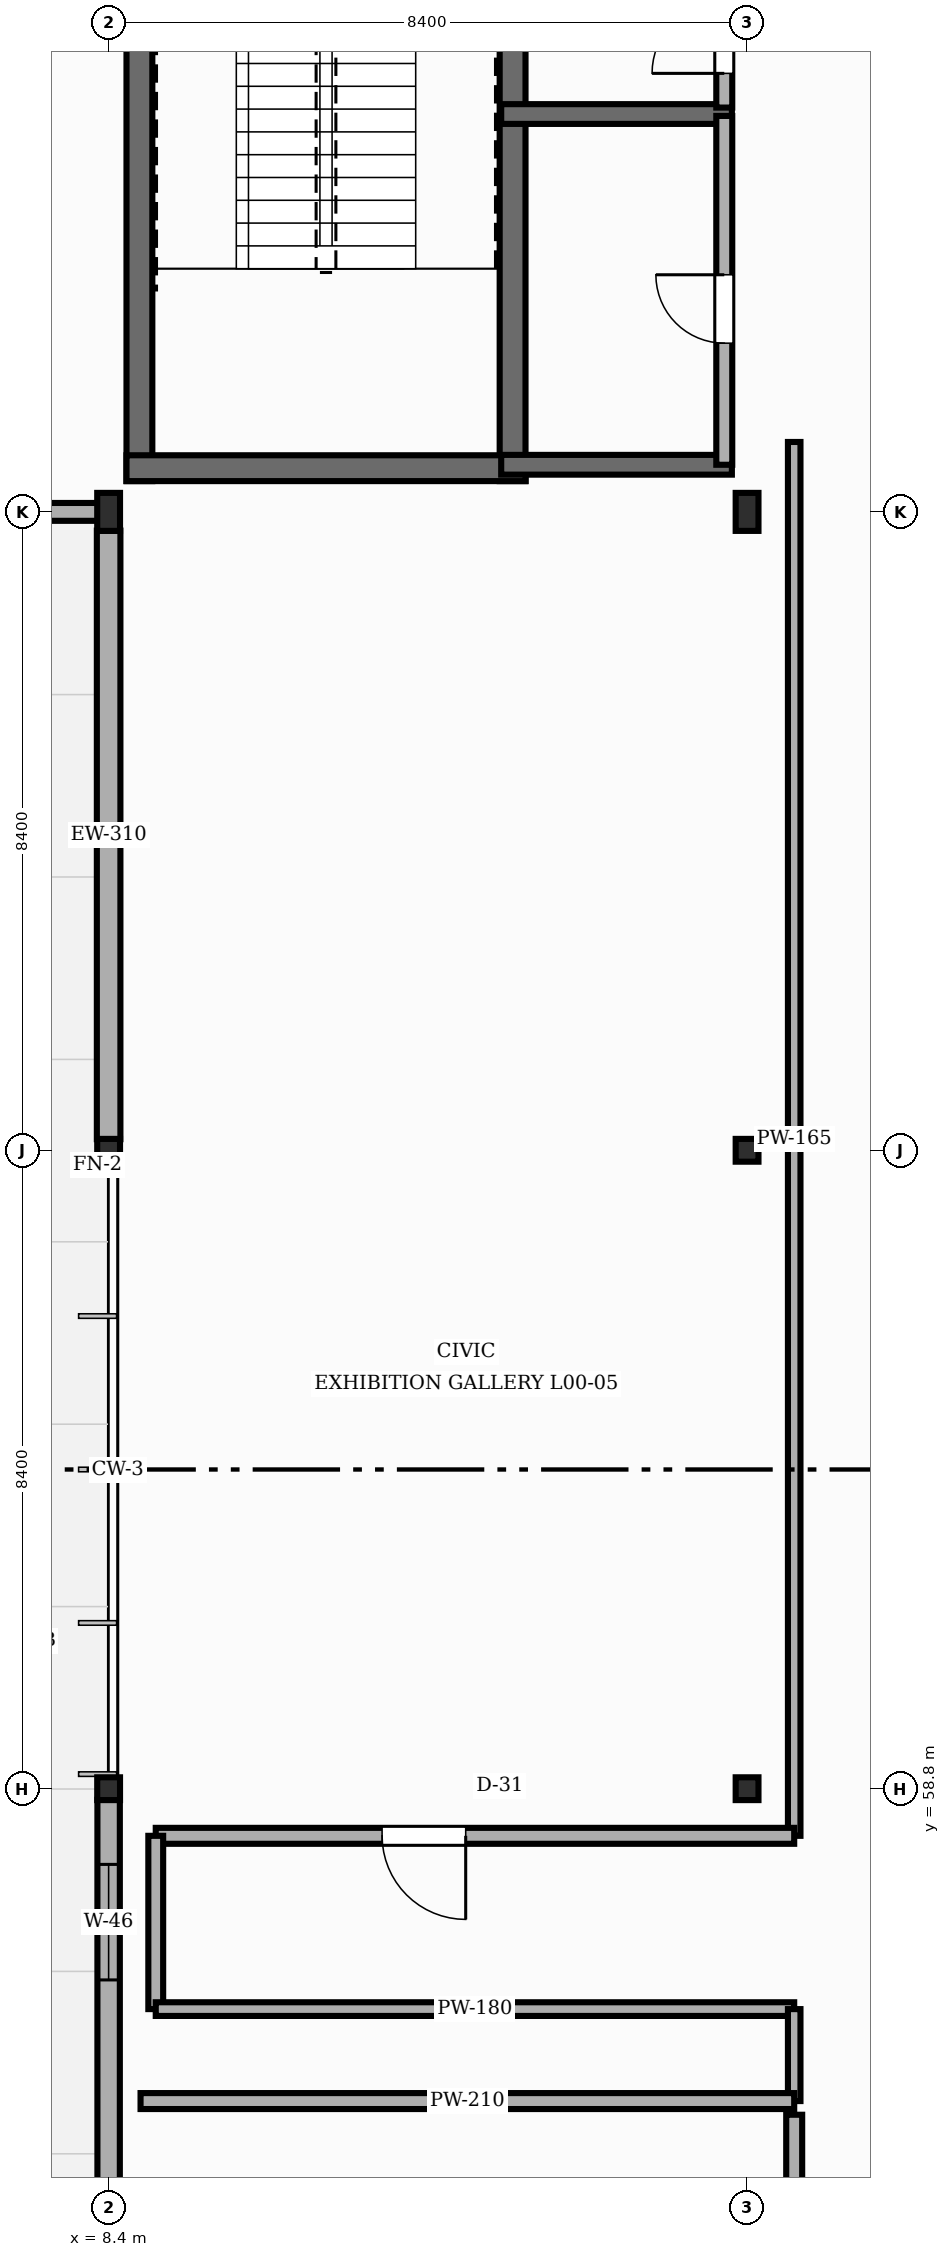
"""IFC4 building model, lengths in metres.
Left out: names, types, materials, properties, quantities, classifications, styles, units other than length and angle.
Written with IfcOpenShell. Run it as: python <this file> out.ifc"""

import sys

from ifc_helpers import new_model, si_unit, direction, frame, frame_2d, origin, origin_2d, place, context, subcontext, project, spatial, rectangle, i_section, extrude, element, fill, save


model = new_model("IFC4")
c1 = context("Model", 3, precision=1e-05, world=origin(), true_north=direction((0.0, 1.0)))
c2 = subcontext(c1, "Body", "Model", "MODEL_VIEW")
j1 = project(units=[si_unit("LENGTHUNIT", "METRE"), si_unit("PLANEANGLEUNIT", "RADIAN")], contexts=[c1])
p1 = place(None, origin())
s1 = spatial("IfcSite", under=j1, at=p1, CompositionType="ELEMENT")
p2 = place(p1, origin())
s2 = spatial("IfcBuilding", under=s1, at=p2, CompositionType="ELEMENT")
p3 = place(p2, origin())
s3 = spatial("IfcBuildingStorey", under=s2, at=p3, CompositionType="ELEMENT", Elevation=0.0)
for number, where, z_axis, x_axis in (
    (1, (8.4, 58.8, 0.0), (0.0, 0.0, 1.0), (1.0, 0.0, 0.0)),
    (2, (8.4, 67.2, 0.0), (0.0, 0.0, 1.0), (1.0, 0.0, 0.0)),
):
    element("IfcColumn", number, at=place(p3, frame(where, z_axis=z_axis, x_axis=x_axis)), inside=s3, PredefinedType="COLUMN", context=c2, shape_type="SweptSolid", body=[
        extrude(i_section(OverallWidth=0.3, OverallDepth=0.3, WebThickness=0.011, FlangeThickness=0.019, FilletRadius=0.027, at=origin_2d()), origin(), (0.0, 0.0, 1.0), 5.4),
    ])
p4 = place(p3, frame((8.4, 75.6, 0.0), z_axis=(0.0, 0.0, 1.0), x_axis=(1.0, 0.0, 0.0)))
e3 = element("IfcColumn", 3, at=p4, inside=s3, PredefinedType="COLUMN", context=c2, shape_type="SweptSolid", body=[
    extrude(i_section(OverallWidth=0.3, OverallDepth=0.5, WebThickness=0.014, FlangeThickness=0.028, FilletRadius=0.027, at=origin_2d()), origin(), (0.0, 0.0, 1.0), 5.4),
])
for number, where, z_axis, x_axis in (
    (4, (16.8, 58.8, 0.0), (0.0, 0.0, 1.0), (1.0, 0.0, 0.0)),
    (5, (16.8, 67.2, 0.0), (0.0, 0.0, 1.0), (1.0, 0.0, 0.0)),
):
    element("IfcColumn", number, at=place(p3, frame(where, z_axis=z_axis, x_axis=x_axis)), inside=s3, PredefinedType="COLUMN", context=c2, shape_type="SweptSolid", body=[
        extrude(i_section(OverallWidth=0.3, OverallDepth=0.3, WebThickness=0.011, FlangeThickness=0.019, FilletRadius=0.027, at=origin_2d()), origin(), (0.0, 0.0, 1.0), 5.4),
    ])
p5 = place(p3, frame((16.8, 75.6, 0.0), z_axis=(0.0, 0.0, 1.0), x_axis=(1.0, 0.0, 0.0)))
e6 = element("IfcColumn", 6, at=p5, inside=s3, PredefinedType="COLUMN", context=c2, shape_type="SweptSolid", body=[
    extrude(i_section(OverallWidth=0.3, OverallDepth=0.5, WebThickness=0.014, FlangeThickness=0.028, FilletRadius=0.027, at=origin_2d()), origin(), (0.0, 0.0, 1.0), 5.4),
])
p6 = place(p3, frame((0.008, 75.6, 0.0), z_axis=(0.0, 0.0, 1.0), x_axis=(1.0, 0.0, 0.0)))
e7 = element("IfcWall", 7, at=p6, inside=s3, PredefinedType="STANDARD", context=c2, shape_type="SweptSolid", body=[
    extrude(rectangle(XDim=8.384, YDim=0.235, at=frame_2d((4.192, 0.0))), origin(), (0.0, 0.0, 1.0), 4.827),
])
p7 = place(p3, frame((8.4, 75.354, 0.0), z_axis=(0.0, 0.0, 1.0), x_axis=(0.0, -1.0, 0.0)))
e8 = element("IfcWall", 8, at=p7, inside=s3, PredefinedType="STANDARD", context=c2, shape_type="SweptSolid", body=[
    extrude(rectangle(XDim=8.008, YDim=0.31, at=frame_2d((4.004, 0.0))), origin(), (0.0, 0.0, 1.0), 4.887),
])
p8 = place(p3, frame((8.4, 58.654, 0.0), z_axis=(0.0, 0.0, 1.0), x_axis=(0.0, -1.0, 0.0)))
e9 = element("IfcWall", 9, at=p8, inside=s3, PredefinedType="STANDARD", context=c2, shape_type="SweptSolid", body=[
    extrude(rectangle(XDim=8.108, YDim=0.295, at=frame_2d((4.054, 0.0))), origin(), (0.0, 0.0, 1.0), 4.887),
])
p9 = place(p8, frame((0.85, 0.0, 0.9)))
e10 = element("IfcOpeningElement", 10, at=p9, cuts=e9, PredefinedType="OPENING", context=c2, shape_type="SweptSolid", body=[
    extrude(rectangle(XDim=1.52, YDim=1.85, at=frame_2d((0.76, 0.925))), frame((0.0, 0.157, 0.0), z_axis=(0.0, -1.0, 0.0), x_axis=(1.0, 0.0, 0.0)), (0.0, 0.0, 1.0), 0.315),
])
p10 = place(p8, frame((5.638, 0.0, 0.9)))
e11 = element("IfcOpeningElement", 11, at=p10, cuts=e9, PredefinedType="OPENING", context=c2, shape_type="SweptSolid", body=[
    extrude(rectangle(XDim=1.62, YDim=1.85, at=frame_2d((0.81, 0.925))), frame((0.0, 0.157, 0.0), z_axis=(0.0, -1.0, 0.0), x_axis=(1.0, 0.0, 0.0)), (0.0, 0.0, 1.0), 0.315),
])
for number, where, z_axis, x_axis in (
    (12, (8.805, 76.005, 0.0), (0.0, 0.0, 1.0), (0.0, 1.0, 0.0)),
    (13, (13.715, 76.005, 0.0), (0.0, 0.0, 1.0), (0.0, 1.0, 0.0)),
):
    element("IfcWall", number, at=place(p3, frame(where, z_axis=z_axis, x_axis=x_axis)), inside=s3, PredefinedType="SHEAR", context=c2, shape_type="SweptSolid", body=[
        extrude(rectangle(XDim=9.99, YDim=0.34, at=frame_2d((4.995, 0.0))), origin(), (0.0, 0.0, 1.0), 5.175),
    ])
p11 = place(p3, frame((8.635, 76.175, 0.0), z_axis=(0.0, 0.0, 1.0), x_axis=(1.0, 0.0, 0.0)))
e14 = element("IfcWall", 14, at=p11, inside=s3, PredefinedType="SHEAR", context=c2, shape_type="SweptSolid", body=[
    extrude(rectangle(XDim=5.25, YDim=0.34, at=frame_2d((2.625, 0.0))), origin(), (0.0, 0.0, 1.0), 5.175),
])
for number, where, z_axis, x_axis in (
    (15, (13.565, 76.22, 0.0), (0.0, 0.0, 1.0), (1.0, 0.0, 0.0)),
    (16, (13.565, 80.835, 0.0), (0.0, 0.0, 1.0), (1.0, 0.0, 0.0)),
):
    element("IfcWall", number, at=place(p3, frame(where, z_axis=z_axis, x_axis=x_axis)), inside=s3, PredefinedType="SHEAR", context=c2, shape_type="SweptSolid", body=[
        extrude(rectangle(XDim=3.035, YDim=0.26, at=frame_2d((1.518, 0.0))), origin(), (0.0, 0.0, 1.0), 5.175),
    ])
p12 = place(p3, frame((16.5, 76.22, 0.0), z_axis=(0.0, 0.0, 1.0), x_axis=(0.0, 1.0, 0.0)))
e17 = element("IfcWall", 17, at=p12, inside=s3, PredefinedType="STANDARD", context=c2, shape_type="SweptSolid", body=[
    extrude(rectangle(XDim=4.59, YDim=0.21, at=frame_2d((2.295, 0.0))), origin(), (0.0, 0.0, 1.0), 4.807),
])
p13 = place(p12, frame((1.6, 0.0, 0.0)))
e18 = element("IfcOpeningElement", 18, at=p13, cuts=e17, PredefinedType="OPENING", context=c2, shape_type="SweptSolid", body=[
    extrude(rectangle(XDim=0.9, YDim=2.1, at=frame_2d((0.45, 1.05))), frame((0.0, 0.115, 0.0), z_axis=(0.0, -1.0, 0.0), x_axis=(1.0, 0.0, 0.0)), (0.0, 0.0, 1.0), 0.23),
])
p14 = place(p3, frame((16.5, 80.92, 0.0), z_axis=(0.0, 0.0, 1.0), x_axis=(0.0, 1.0, 0.0)))
e19 = element("IfcWall", 19, at=p14, inside=s3, PredefinedType="STANDARD", context=c2, shape_type="SweptSolid", body=[
    extrude(rectangle(XDim=4.48, YDim=0.21, at=frame_2d((2.24, 0.0))), origin(), (0.0, 0.0, 1.0), 4.807),
])
p15 = place(p14, frame((0.45, 0.0, 0.0)))
e20 = element("IfcOpeningElement", 20, at=p15, cuts=e19, PredefinedType="OPENING", context=c2, shape_type="SweptSolid", body=[
    extrude(rectangle(XDim=0.95, YDim=2.15, at=frame_2d((0.475, 1.075))), frame((0.0, 0.115, 0.0), z_axis=(0.0, -1.0, 0.0), x_axis=(1.0, 0.0, 0.0)), (0.0, 0.0, 1.0), 0.23),
])
p16 = place(p3, frame((17.42, 76.52, -0.004), z_axis=(0.0, 0.0, 1.0), x_axis=(0.0, -1.0, 0.0)))
e21 = element("IfcWall", 21, at=p16, inside=s3, PredefinedType="STANDARD", context=c2, shape_type="SweptSolid", body=[
    extrude(rectangle(XDim=18.34, YDim=0.165, at=frame_2d((9.17, 0.0))), origin(), (0.0, 0.0, 1.0), 5.179),
])
p17 = place(p3, frame((17.42, 58.18, -0.004), z_axis=(0.0, 0.0, 1.0), x_axis=(-1.0, 0.0, 0.0)))
e22 = element("IfcWall", 22, at=p17, inside=s3, PredefinedType="STANDARD", context=c2, shape_type="SweptSolid", body=[
    extrude(rectangle(XDim=8.4, YDim=0.21, at=frame_2d((4.2, 0.0))), origin(), (0.0, 0.0, 1.0), 5.179),
])
p18 = place(p17, frame((4.322, 0.0, 0.0)))
e23 = element("IfcOpeningElement", 23, at=p18, cuts=e22, PredefinedType="OPENING", context=c2, shape_type="SweptSolid", body=[
    extrude(rectangle(XDim=1.1, YDim=2.3, at=frame_2d((0.55, 1.15))), frame((0.0, 0.115, 0.0), z_axis=(0.0, -1.0, 0.0), x_axis=(1.0, 0.0, 0.0)), (0.0, 0.0, 1.0), 0.23),
])
p19 = place(p3, frame((9.02, 58.18, -0.004), z_axis=(0.0, 0.0, 1.0), x_axis=(0.0, -1.0, 0.0)))
e24 = element("IfcWall", 24, at=p19, inside=s3, PredefinedType="STANDARD", context=c2, shape_type="SweptSolid", body=[
    extrude(rectangle(XDim=2.28, YDim=0.195, at=frame_2d((1.14, 0.0))), origin(), (0.0, 0.0, 1.0), 5.179),
])
p20 = place(p3, frame((9.02, 55.9, -0.004), z_axis=(0.0, 0.0, 1.0), x_axis=(1.0, 0.0, 0.0)))
e25 = element("IfcWall", 25, at=p20, inside=s3, PredefinedType="STANDARD", context=c2, shape_type="SweptSolid", body=[
    extrude(rectangle(XDim=8.4, YDim=0.18, at=frame_2d((4.2, 0.0))), origin(), (0.0, 0.0, 1.0), 5.179),
])
p21 = place(p3, frame((17.42, 55.9, -0.004), z_axis=(0.0, 0.0, 1.0), x_axis=(0.0, -1.0, 0.0)))
e26 = element("IfcWall", 26, at=p21, inside=s3, PredefinedType="STANDARD", context=c2, shape_type="SweptSolid", body=[
    extrude(rectangle(XDim=1.21, YDim=0.165, at=frame_2d((0.605, 0.0))), origin(), (0.0, 0.0, 1.0), 5.179),
])
p22 = place(p3, frame((17.42, 54.69, -0.004), z_axis=(0.0, 0.0, 1.0), x_axis=(-1.0, 0.0, 0.0)))
e27 = element("IfcWall", 27, at=p22, inside=s3, PredefinedType="STANDARD", context=c2, shape_type="SweptSolid", body=[
    extrude(rectangle(XDim=8.6, YDim=0.21, at=frame_2d((4.3, 0.0))), origin(), (0.0, 0.0, 1.0), 5.179),
])
p23 = place(p3, frame((17.42, 54.51, -0.004), z_axis=(0.0, 0.0, 1.0), x_axis=(0.0, -1.0, 0.0)))
e28 = element("IfcWall", 28, at=p23, inside=s3, PredefinedType="STANDARD", context=c2, shape_type="SweptSolid", body=[
    extrude(rectangle(XDim=3.49, YDim=0.21, at=frame_2d((1.745, 0.0))), origin(), (0.0, 0.0, 1.0), 5.179),
])
p24 = place(p9, origin())
e29 = element("IfcWindow", 29, at=p24, inside=s3, PartitioningType="SINGLE_PANEL", PredefinedType="WINDOW", context=c2, shape_type="SweptSolid", body=[
    extrude(rectangle(XDim=1.52, YDim=1.85, at=frame_2d((0.76, 0.925))), frame((0.0, 0.03, 0.0), z_axis=(0.0, -1.0, 0.0), x_axis=(1.0, 0.0, 0.0)), (0.0, 0.0, 1.0), 0.06),
])
fill(e10, e29)
p25 = place(p13, origin())
e30 = element("IfcDoor", 30, at=p25, inside=s3, OperationType="SINGLE_SWING_RIGHT", PredefinedType="DOOR", context=c2, shape_type="SweptSolid", body=[
    extrude(rectangle(XDim=0.9, YDim=2.1, at=frame_2d((0.45, 1.05))), frame((0.0, 0.025, 0.0), z_axis=(0.0, -1.0, 0.0), x_axis=(1.0, 0.0, 0.0)), (0.0, 0.0, 1.0), 0.05),
])
fill(e18, e30)
p26 = place(p15, origin())
e31 = element("IfcDoor", 31, at=p26, inside=s3, OperationType="SINGLE_SWING_LEFT", PredefinedType="DOOR", context=c2, shape_type="SweptSolid", body=[
    extrude(rectangle(XDim=0.95, YDim=2.15, at=frame_2d((0.475, 1.075))), frame((0.0, 0.025, 0.0), z_axis=(0.0, -1.0, 0.0), x_axis=(1.0, 0.0, 0.0)), (0.0, 0.0, 1.0), 0.05),
])
fill(e20, e31)
p27 = place(p18, origin())
e32 = element("IfcDoor", 32, at=p27, inside=s3, OperationType="SINGLE_SWING_LEFT", PredefinedType="DOOR", context=c2, shape_type="SweptSolid", body=[
    extrude(rectangle(XDim=1.1, YDim=2.3, at=frame_2d((0.55, 1.15))), frame((0.0, 0.025, 0.0), z_axis=(0.0, -1.0, 0.0), x_axis=(1.0, 0.0, 0.0)), (0.0, 0.0, 1.0), 0.05),
])
fill(e23, e32)
save(model, sys.argv[1])
